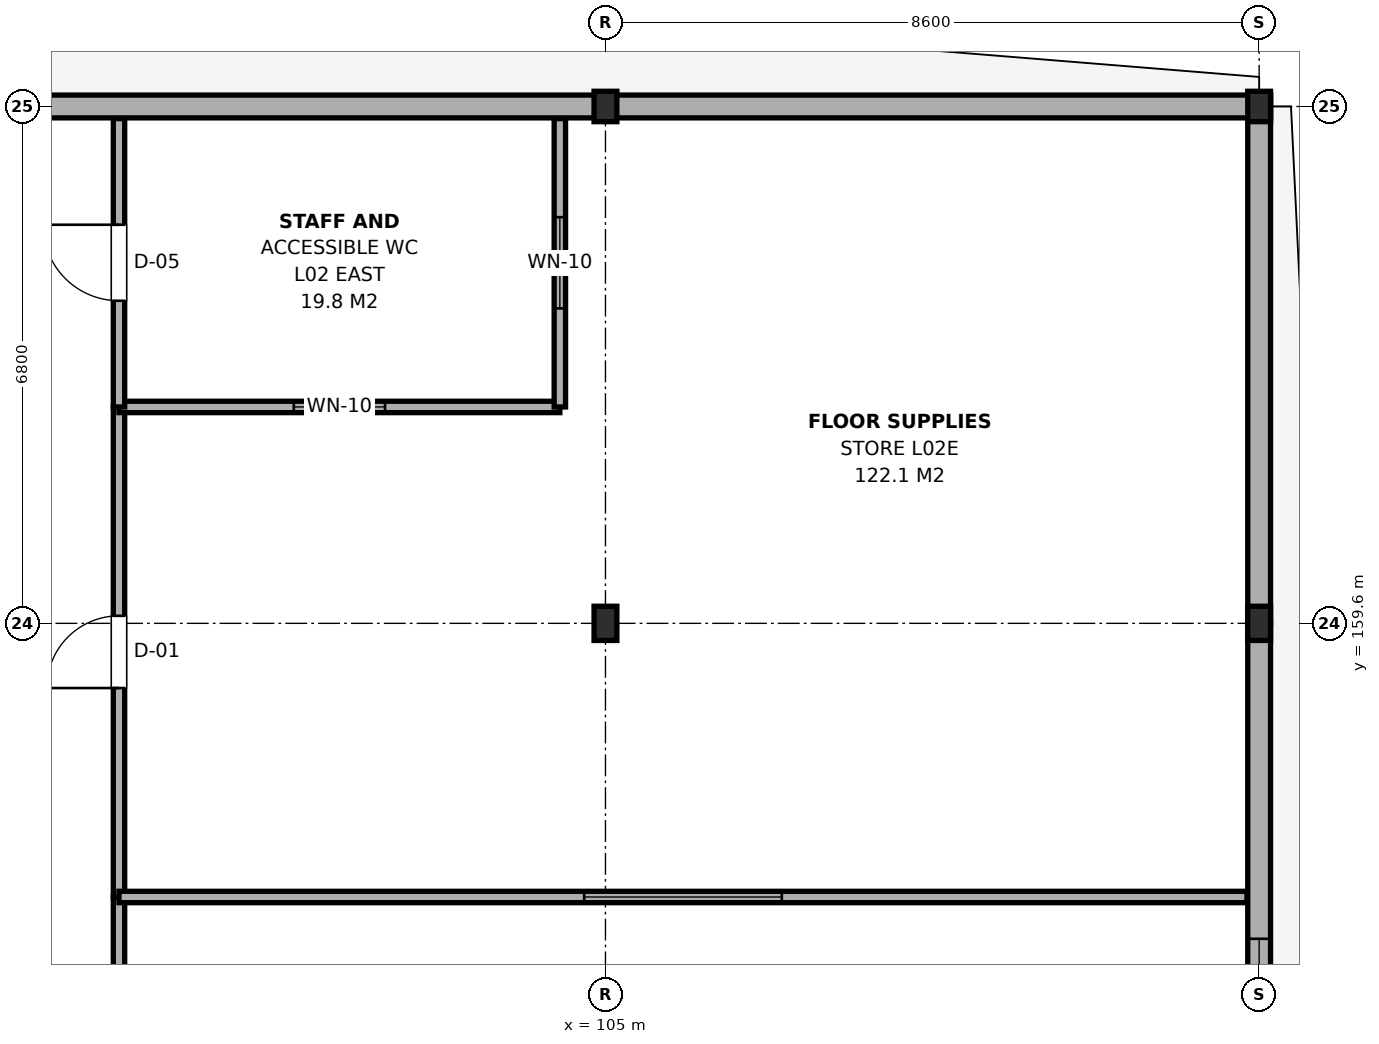
"""IFC4 building model, lengths in metres.
Left out: names, types, materials, properties, quantities, classifications, styles, units other than length and angle.
Written with IfcOpenShell. Run it as: python <this file> out.ifc"""

import sys

from ifc_helpers import new_model, si_unit, direction, frame, frame_2d, origin, origin_2d, place, context, subcontext, project, spatial, rectangle, i_section, extrude, element, fill, save


model = new_model("IFC4")
c1 = context("Model", 3, precision=1e-05, world=origin(), true_north=direction((0.0, 1.0)))
c2 = subcontext(c1, "Body", "Model", "MODEL_VIEW")
j1 = project(units=[si_unit("LENGTHUNIT", "METRE"), si_unit("PLANEANGLEUNIT", "RADIAN")], contexts=[c1])
p1 = place(None, origin())
s1 = spatial("IfcSite", under=j1, at=p1, CompositionType="ELEMENT")
p2 = place(p1, origin())
s2 = spatial("IfcBuilding", under=s1, at=p2, CompositionType="ELEMENT")
p3 = place(p2, frame((0.0, 0.0, 9.0)))
s3 = spatial("IfcBuildingStorey", under=s2, at=p3, CompositionType="ELEMENT", Elevation=9.0)
p4 = place(p3, frame((105.0, 159.6, 0.0), z_axis=(0.0, 0.0, 1.0), x_axis=(1.0, 0.0, 0.0)))
e1 = element("IfcColumn", 1, at=p4, inside=s3, PredefinedType="COLUMN", context=c2, shape_type="SweptSolid", body=[
    extrude(i_section(OverallWidth=0.3, OverallDepth=0.45, WebThickness=0.014, FlangeThickness=0.026, FilletRadius=0.027, at=origin_2d()), origin(), (0.0, 0.0, 1.0), 4.2),
])
p5 = place(p3, frame((105.0, 166.4, 0.0), z_axis=(0.0, 0.0, 1.0), x_axis=(1.0, 0.0, 0.0)))
e2 = element("IfcColumn", 2, at=p5, inside=s3, PredefinedType="COLUMN", context=c2, shape_type="SweptSolid", body=[
    extrude(i_section(OverallWidth=0.3, OverallDepth=0.4, WebThickness=0.013, FlangeThickness=0.024, FilletRadius=0.027, at=origin_2d()), origin(), (0.0, 0.0, 1.0), 4.2),
])
p6 = place(p3, frame((113.6, 159.6, 0.0), z_axis=(0.0, 0.0, 1.0), x_axis=(1.0, 0.0, 0.0)))
e3 = element("IfcColumn", 3, at=p6, inside=s3, PredefinedType="COLUMN", context=c2, shape_type="SweptSolid", body=[
    extrude(i_section(OverallWidth=0.3, OverallDepth=0.45, WebThickness=0.014, FlangeThickness=0.026, FilletRadius=0.027, at=origin_2d()), origin(), (0.0, 0.0, 1.0), 4.2),
])
p7 = place(p3, frame((113.6, 166.4, 0.0), z_axis=(0.0, 0.0, 1.0), x_axis=(1.0, 0.0, 0.0)))
e4 = element("IfcColumn", 4, at=p7, inside=s3, PredefinedType="COLUMN", context=c2, shape_type="SweptSolid", body=[
    extrude(i_section(OverallWidth=0.3, OverallDepth=0.4, WebThickness=0.013, FlangeThickness=0.024, FilletRadius=0.027, at=origin_2d()), origin(), (0.0, 0.0, 1.0), 4.2),
])
p8 = place(p3, frame((113.6, 152.4, 0.0), z_axis=(0.0, 0.0, 1.0), x_axis=(0.0, 1.0, 0.0)))
e5 = element("IfcWall", 5, at=p8, inside=s3, PredefinedType="SOLIDWALL", context=c2, shape_type="SweptSolid", body=[
    extrude(rectangle(XDim=7.2, YDim=0.3, at=frame_2d((3.6, 0.0))), origin(), (0.0, 0.0, 1.0), 3.375),
])
p9 = place(p8, frame((1.25, 0.0, 1.1)))
e6 = element("IfcOpeningElement", 6, at=p9, cuts=e5, PredefinedType="OPENING", context=c2, shape_type="SweptSolid", body=[
    extrude(rectangle(XDim=1.8, YDim=1.2, at=frame_2d((0.9, 0.6))), frame((0.0, 0.165, 0.0), z_axis=(0.0, -1.0, 0.0), x_axis=(1.0, 0.0, 0.0)), (0.0, 0.0, 1.0), 0.33),
])
p10 = place(p3, frame((113.6, 159.6, 0.0), z_axis=(0.0, 0.0, 1.0), x_axis=(0.0, 1.0, 0.0)))
e7 = element("IfcWall", 7, at=p10, inside=s3, PredefinedType="SOLIDWALL", context=c2, shape_type="SweptSolid", body=[
    extrude(rectangle(XDim=6.95, YDim=0.3, at=frame_2d((3.475, 0.0))), origin(), (0.0, 0.0, 1.0), 3.425),
])
p11 = place(p3, frame((96.0, 166.4, 0.0), z_axis=(0.0, 0.0, 1.0), x_axis=(1.0, 0.0, 0.0)))
e8 = element("IfcWall", 8, at=p11, inside=s3, PredefinedType="SOLIDWALL", context=c2, shape_type="SweptSolid", body=[
    extrude(rectangle(XDim=9.0, YDim=0.3, at=frame_2d((4.5, 0.0))), origin(), (0.0, 0.0, 1.0), 3.485),
])
p12 = place(p3, frame((105.0, 166.4, 0.0), z_axis=(0.0, 0.0, 1.0), x_axis=(1.0, 0.0, 0.0)))
e9 = element("IfcWall", 9, at=p12, inside=s3, PredefinedType="SOLIDWALL", context=c2, shape_type="SweptSolid", body=[
    extrude(rectangle(XDim=8.75, YDim=0.3, at=frame_2d((4.375, 0.0))), origin(), (0.0, 0.0, 1.0), 3.535),
])
p13 = place(p3, frame((98.6, 142.2, 0.0), z_axis=(0.0, 0.0, 1.0), x_axis=(0.0, 1.0, 0.0)))
e10 = element("IfcWall", 10, at=p13, inside=s3, PredefinedType="PARTITIONING", context=c2, shape_type="SweptSolid", body=[
    extrude(rectangle(XDim=13.8, YDim=0.15, at=frame_2d((6.9, 0.0))), origin(), (0.0, 0.0, 1.0), 3.435),
])
p14 = place(p13, frame((6.375, 0.0, 0.0)))
e11 = element("IfcOpeningElement", 11, at=p14, cuts=e10, PredefinedType="OPENING", context=c2, shape_type="SweptSolid", body=[
    extrude(rectangle(XDim=1.05, YDim=2.15, at=frame_2d((0.525, 1.075))), frame((0.0, 0.09, 0.0), z_axis=(0.0, -1.0, 0.0), x_axis=(1.0, 0.0, 0.0)), (0.0, 0.0, 1.0), 0.18),
])
p15 = place(p13, frame((8.636, 0.0, 0.95)))
e12 = element("IfcOpeningElement", 12, at=p15, cuts=e10, PredefinedType="OPENING", context=c2, shape_type="SweptSolid", body=[
    extrude(rectangle(XDim=2.6, YDim=1.5, at=frame_2d((1.3, 0.75))), frame((0.0, 0.09, 0.0), z_axis=(0.0, -1.0, 0.0), x_axis=(1.0, 0.0, 0.0)), (0.0, 0.0, 1.0), 0.18),
])
p16 = place(p3, frame((98.6, 156.0, 0.0), z_axis=(0.0, 0.0, 1.0), x_axis=(0.0, 1.0, 0.0)))
e13 = element("IfcWall", 13, at=p16, inside=s3, PredefinedType="PARTITIONING", context=c2, shape_type="SweptSolid", body=[
    extrude(rectangle(XDim=6.447, YDim=0.15, at=frame_2d((3.224, 0.0))), origin(), (0.0, 0.0, 1.0), 3.625),
])
p17 = place(p16, frame((2.749, 0.0, 0.0)))
e14 = element("IfcOpeningElement", 14, at=p17, cuts=e13, PredefinedType="OPENING", context=c2, shape_type="SweptSolid", body=[
    extrude(rectangle(XDim=0.95, YDim=2.15, at=frame_2d((0.475, 1.075))), frame((0.0, 0.09, 0.0), z_axis=(0.0, -1.0, 0.0), x_axis=(1.0, 0.0, 0.0)), (0.0, 0.0, 1.0), 0.18),
])
p18 = place(p3, frame((98.6, 162.447, 0.0), z_axis=(0.0, 0.0, 1.0), x_axis=(1.0, 0.0, 0.0)))
e15 = element("IfcWall", 15, at=p18, inside=s3, PredefinedType="PARTITIONING", context=c2, shape_type="SweptSolid", body=[
    extrude(rectangle(XDim=5.8, YDim=0.15, at=frame_2d((2.9, 0.0))), origin(), (0.0, 0.0, 1.0), 3.975),
])
p19 = place(p18, frame((2.3, 0.0, 0.95)))
e16 = element("IfcOpeningElement", 16, at=p19, cuts=e15, PredefinedType="OPENING", context=c2, shape_type="SweptSolid", body=[
    extrude(rectangle(XDim=1.2, YDim=1.5, at=frame_2d((0.6, 0.75))), frame((0.0, 0.09, 0.0), z_axis=(0.0, -1.0, 0.0), x_axis=(1.0, 0.0, 0.0)), (0.0, 0.0, 1.0), 0.18),
])
p20 = place(p3, frame((104.4, 162.447, 0.0), z_axis=(0.0, 0.0, 1.0), x_axis=(0.0, 1.0, 0.0)))
e17 = element("IfcWall", 17, at=p20, inside=s3, PredefinedType="PARTITIONING", context=c2, shape_type="SweptSolid", body=[
    extrude(rectangle(XDim=3.793, YDim=0.15, at=frame_2d((1.896, 0.0))), origin(), (0.0, 0.0, 1.0), 3.535),
])
p21 = place(p20, frame((1.296, 0.0, 0.95)))
e18 = element("IfcOpeningElement", 18, at=p21, cuts=e17, PredefinedType="OPENING", context=c2, shape_type="SweptSolid", body=[
    extrude(rectangle(XDim=1.2, YDim=1.5, at=frame_2d((0.6, 0.75))), frame((0.0, 0.09, 0.0), z_axis=(0.0, -1.0, 0.0), x_axis=(1.0, 0.0, 0.0)), (0.0, 0.0, 1.0), 0.18),
])
p22 = place(p3, frame((98.6, 162.447, 0.0), z_axis=(0.0, 0.0, 1.0), x_axis=(0.0, 1.0, 0.0)))
e19 = element("IfcWall", 19, at=p22, inside=s3, PredefinedType="PARTITIONING", context=c2, shape_type="SweptSolid", body=[
    extrude(rectangle(XDim=3.793, YDim=0.15, at=frame_2d((1.896, 0.0))), origin(), (0.0, 0.0, 1.0), 3.535),
])
p23 = place(p22, frame((1.397, 0.0, 0.0)))
e20 = element("IfcOpeningElement", 20, at=p23, cuts=e19, PredefinedType="OPENING", context=c2, shape_type="SweptSolid", body=[
    extrude(rectangle(XDim=1.0, YDim=2.15, at=frame_2d((0.5, 1.075))), frame((0.0, 0.09, 0.0), z_axis=(0.0, -1.0, 0.0), x_axis=(1.0, 0.0, 0.0)), (0.0, 0.0, 1.0), 0.18),
])
p24 = place(p3, frame((98.6, 156.0, 0.0), z_axis=(0.0, 0.0, 1.0), x_axis=(1.0, 0.0, 0.0)))
e21 = element("IfcWall", 21, at=p24, inside=s3, PredefinedType="PARTITIONING", context=c2, shape_type="SweptSolid", body=[
    extrude(rectangle(XDim=14.84, YDim=0.15, at=frame_2d((7.42, 0.0))), origin(), (0.0, 0.0, 1.0), 3.425),
])
p25 = place(p24, frame((6.12, 0.0, 0.95)))
e22 = element("IfcOpeningElement", 22, at=p25, cuts=e21, PredefinedType="OPENING", context=c2, shape_type="SweptSolid", body=[
    extrude(rectangle(XDim=2.6, YDim=1.5, at=frame_2d((1.3, 0.75))), frame((0.0, 0.09, 0.0), z_axis=(0.0, -1.0, 0.0), x_axis=(1.0, 0.0, 0.0)), (0.0, 0.0, 1.0), 0.18),
])
p26 = place(p9, origin())
e23 = element("IfcWindow", 23, at=p26, inside=s3, PartitioningType="SINGLE_PANEL", PredefinedType="WINDOW", context=c2, shape_type="SweptSolid", body=[
    extrude(rectangle(XDim=1.8, YDim=1.2, at=frame_2d((0.9, 0.6))), frame((0.0, 0.03, 0.0), z_axis=(0.0, -1.0, 0.0), x_axis=(1.0, 0.0, 0.0)), (0.0, 0.0, 1.0), 0.06),
])
fill(e6, e23)
p27 = place(p17, origin())
e24 = element("IfcDoor", 24, at=p27, inside=s3, OperationType="SINGLE_SWING_LEFT", PredefinedType="DOOR", context=c2, shape_type="SweptSolid", body=[
    extrude(rectangle(XDim=0.95, YDim=2.15, at=frame_2d((0.475, 1.075))), frame((0.0, 0.025, 0.0), z_axis=(0.0, -1.0, 0.0), x_axis=(1.0, 0.0, 0.0)), (0.0, 0.0, 1.0), 0.05),
])
fill(e14, e24)
p28 = place(p19, origin())
e25 = element("IfcWindow", 25, at=p28, inside=s3, PartitioningType="SINGLE_PANEL", PredefinedType="WINDOW", context=c2, shape_type="SweptSolid", body=[
    extrude(rectangle(XDim=1.2, YDim=1.5, at=frame_2d((0.6, 0.75))), frame((0.0, 0.03, 0.0), z_axis=(0.0, -1.0, 0.0), x_axis=(1.0, 0.0, 0.0)), (0.0, 0.0, 1.0), 0.06),
])
fill(e16, e25)
p29 = place(p21, origin())
e26 = element("IfcWindow", 26, at=p29, inside=s3, PartitioningType="SINGLE_PANEL", PredefinedType="WINDOW", context=c2, shape_type="SweptSolid", body=[
    extrude(rectangle(XDim=1.2, YDim=1.5, at=frame_2d((0.6, 0.75))), frame((0.0, 0.03, 0.0), z_axis=(0.0, -1.0, 0.0), x_axis=(1.0, 0.0, 0.0)), (0.0, 0.0, 1.0), 0.06),
])
fill(e18, e26)
p30 = place(p23, origin())
e27 = element("IfcDoor", 27, at=p30, inside=s3, OperationType="SINGLE_SWING_RIGHT", PredefinedType="DOOR", context=c2, shape_type="SweptSolid", body=[
    extrude(rectangle(XDim=1.0, YDim=2.15, at=frame_2d((0.5, 1.075))), frame((0.0, 0.025, 0.0), z_axis=(0.0, -1.0, 0.0), x_axis=(1.0, 0.0, 0.0)), (0.0, 0.0, 1.0), 0.05),
])
fill(e20, e27)
p31 = place(p25, origin())
e28 = element("IfcWindow", 28, at=p31, inside=s3, PartitioningType="SINGLE_PANEL", PredefinedType="WINDOW", context=c2, shape_type="SweptSolid", body=[
    extrude(rectangle(XDim=2.6, YDim=1.5, at=frame_2d((1.3, 0.75))), frame((0.0, 0.03, 0.0), z_axis=(0.0, -1.0, 0.0), x_axis=(1.0, 0.0, 0.0)), (0.0, 0.0, 1.0), 0.06),
])
fill(e22, e28)
save(model, sys.argv[1])
